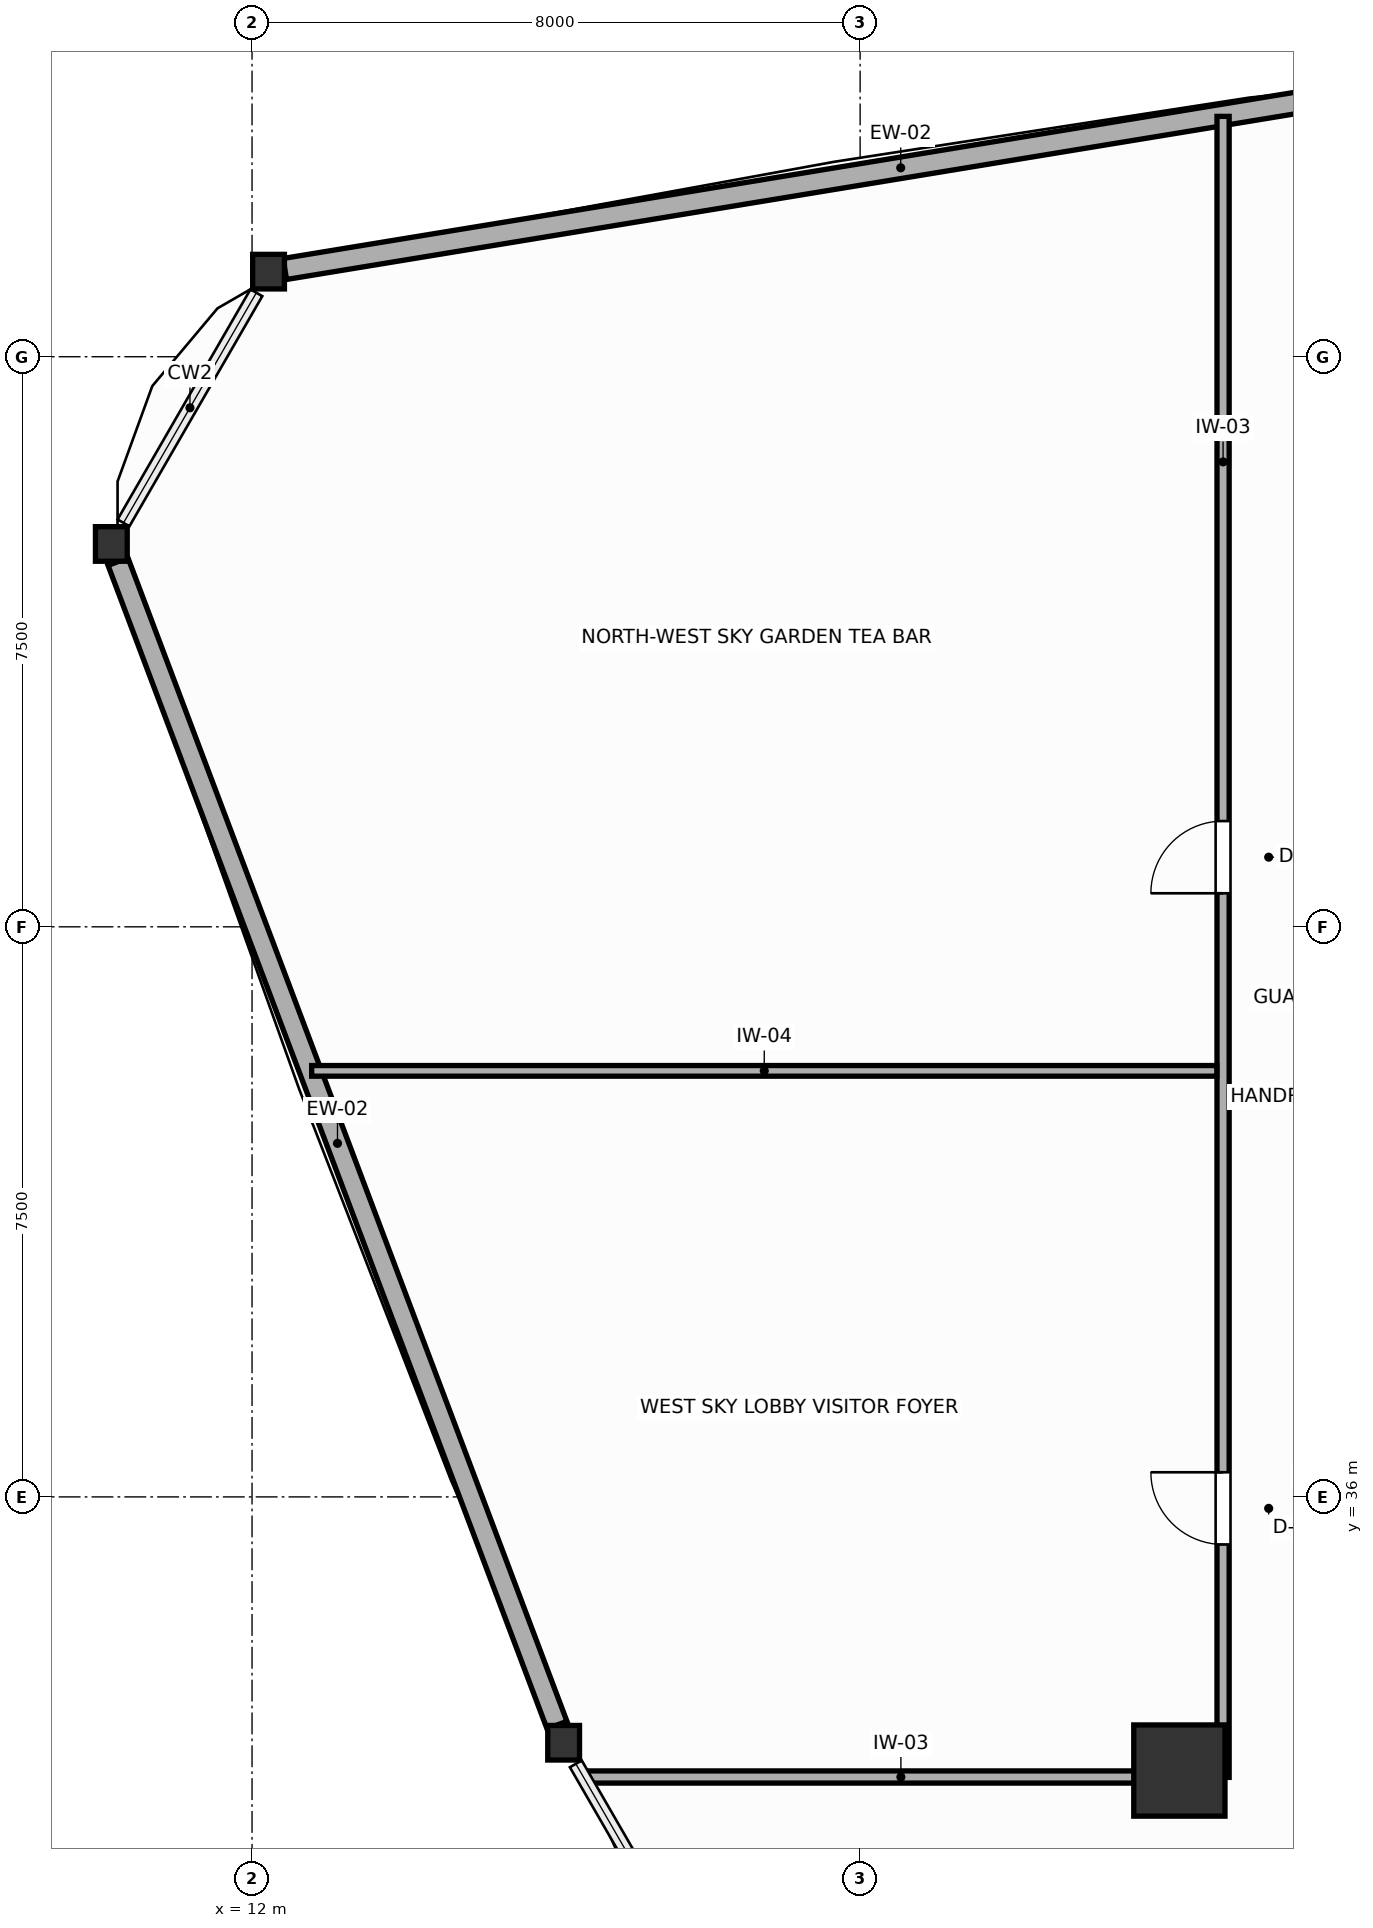
"""IFC4 building model, lengths in metres.
Left out: names, types, materials, properties, quantities, classifications, styles, units other than length and angle.
Written with IfcOpenShell. Run it as: python <this file> out.ifc"""

import sys

from ifc_helpers import new_model, si_unit, direction, frame, frame_2d, origin, origin_2d, place, context, subcontext, project, spatial, rectangle, i_section, extrude, source, transform, mapped, element, fill, save


model = new_model("IFC4")
c1 = context("Model", 3, precision=1e-05, world=origin(), true_north=direction((0.0, 1.0)))
c2 = subcontext(c1, "Body", "Model", "MODEL_VIEW")
j1 = project(units=[si_unit("LENGTHUNIT", "METRE"), si_unit("PLANEANGLEUNIT", "RADIAN")], contexts=[c1])
p1 = place(None, origin())
s1 = spatial("IfcSite", under=j1, at=p1, CompositionType="ELEMENT")
p2 = place(p1, origin())
s2 = spatial("IfcBuilding", under=s1, at=p2, CompositionType="ELEMENT")
p3 = place(p2, frame((0.0, 0.0, 99.0)))
s3 = spatial("IfcBuildingStorey", under=s2, at=p3, CompositionType="ELEMENT", Elevation=99.0)
m1 = source(origin(), c2, "Body", "SweptSolid", [
    extrude(rectangle(XDim=1.2, YDim=1.2, at=origin_2d()), origin(), (0.0, 0.0, 1.0), 3.6),
])
p4 = place(p3, frame((24.2, 32.4, 0.0), z_axis=(0.0, 0.0, 1.0), x_axis=(1.0, 0.0, 0.0)))
e1 = element("IfcColumn", 1, at=p4, inside=s3, PredefinedType="COLUMN", context=c2, shape_type="MappedRepresentation", body=[
    mapped(m1, transform((0.0, 0.0, 0.0), scale=1.0)),
])
m2 = source(origin(), c2, "Body", "SweptSolid", [
    extrude(i_section(OverallWidth=0.418, OverallDepth=0.455, WebThickness=0.039, FlangeThickness=0.063, FilletRadius=0.015, at=origin_2d()), origin(), (0.0, 0.0, 1.0), 3.6),
])
for number, where, z_axis, x_axis in (
    (2, (12.217, 52.119, 0.0), (0.0, 0.0, 1.0), (1.0, 0.0, 0.0)),
    (3, (10.149, 48.537, 0.0), (0.0, 0.0, 1.0), (1.0, 0.0, 0.0)),
    (4, (16.099, 32.766, 0.0), (0.0, 0.0, 1.0), (1.0, 0.0, 0.0)),
):
    element("IfcColumn", number, at=place(p3, frame(where, z_axis=z_axis, x_axis=x_axis)), inside=s3, PredefinedType="COLUMN", context=c2, shape_type="MappedRepresentation", body=[
        mapped(m2, transform((0.0, 0.0, 0.0), scale=1.0)),
    ])
p5 = place(p3, frame((28.637, 54.816, 0.0), z_axis=(0.0, 0.0, 1.0), x_axis=(-0.986776921995, -0.162084256539, 0.0)))
e5 = element("IfcWall", 5, at=p5, inside=s3, PredefinedType="SOLIDWALL", context=c2, shape_type="SweptSolid", body=[
    extrude(rectangle(XDim=16.423, YDim=0.28, at=frame_2d((8.211, 0.0))), origin(), (0.0, 0.0, 1.0), 2.95),
])
p6 = place(p3, frame((10.237, 48.304, 0.0), z_axis=(0.0, 0.0, 1.0), x_axis=(0.353021512356, -0.935615204993, 0.0)))
e6 = element("IfcWall", 6, at=p6, inside=s3, PredefinedType="SOLIDWALL", context=c2, shape_type="SweptSolid", body=[
    extrude(rectangle(XDim=16.359, YDim=0.28, at=frame_2d((8.18, 0.0))), origin(), (0.0, 0.0, 1.0), 2.95),
])
p7 = place(p3, frame((24.775, 32.31, 0.0), z_axis=(0.0, 0.0, 1.0), x_axis=(0.0, 1.0, 0.0)))
e7 = element("IfcWall", 7, at=p7, inside=s3, PredefinedType="PARTITIONING", context=c2, shape_type="SweptSolid", body=[
    extrude(rectangle(XDim=21.852, YDim=0.16, at=frame_2d((10.926, 0.0))), origin(), (0.0, 0.0, 1.0), 3.4),
])
p8 = place(p7, frame((3.064, 0.0, 0.0)))
e8 = element("IfcOpeningElement", 8, at=p8, cuts=e7, PredefinedType="OPENING", context=c2, shape_type="SweptSolid", body=[
    extrude(rectangle(XDim=0.95, YDim=2.05, at=frame_2d((0.475, 1.025))), frame((0.0, 0.09, 0.0), z_axis=(0.0, -1.0, 0.0), x_axis=(1.0, 0.0, 0.0)), (0.0, 0.0, 1.0), 0.18),
])
p9 = place(p7, frame((11.631, 0.0, 0.0)))
e9 = element("IfcOpeningElement", 9, at=p9, cuts=e7, PredefinedType="OPENING", context=c2, shape_type="SweptSolid", body=[
    extrude(rectangle(XDim=0.95, YDim=2.05, at=frame_2d((0.475, 1.025))), frame((0.0, 0.09, 0.0), z_axis=(0.0, -1.0, 0.0), x_axis=(1.0, 0.0, 0.0)), (0.0, 0.0, 1.0), 0.18),
])
p10 = place(p3, frame((16.38, 32.315, 0.0), z_axis=(0.0, 0.0, 1.0), x_axis=(1.0, 0.0, 0.0)))
e10 = element("IfcWall", 10, at=p10, inside=s3, PredefinedType="PARTITIONING", context=c2, shape_type="SweptSolid", body=[
    extrude(rectangle(XDim=8.313, YDim=0.16, at=frame_2d((4.157, 0.0))), origin(), (0.0, 0.0, 1.0), 2.95),
])
p11 = place(p3, frame((12.784, 41.605, 0.0), z_axis=(0.0, 0.0, 1.0), x_axis=(1.0, 0.0, 0.0)))
e11 = element("IfcWall", 11, at=p11, inside=s3, PredefinedType="PARTITIONING", context=c2, shape_type="SweptSolid", body=[
    extrude(rectangle(XDim=11.909, YDim=0.14, at=frame_2d((5.955, 0.0))), origin(), (0.0, 0.0, 1.0), 3.4),
])
p12 = place(p8, origin())
e12 = element("IfcDoor", 12, at=p12, inside=s3, OperationType="SINGLE_SWING_RIGHT", PredefinedType="DOOR", context=c2, shape_type="SweptSolid", body=[
    extrude(rectangle(XDim=0.95, YDim=2.05, at=frame_2d((0.475, 1.025))), frame((0.0, 0.025, 0.0), z_axis=(0.0, -1.0, 0.0), x_axis=(1.0, 0.0, 0.0)), (0.0, 0.0, 1.0), 0.05),
])
fill(e8, e12)
p13 = place(p9, origin())
e13 = element("IfcDoor", 13, at=p13, inside=s3, OperationType="SINGLE_SWING_LEFT", PredefinedType="DOOR", context=c2, shape_type="SweptSolid", body=[
    extrude(rectangle(XDim=0.95, YDim=2.05, at=frame_2d((0.475, 1.025))), frame((0.0, 0.025, 0.0), z_axis=(0.0, -1.0, 0.0), x_axis=(1.0, 0.0, 0.0)), (0.0, 0.0, 1.0), 0.05),
])
fill(e9, e13)
save(model, sys.argv[1])
